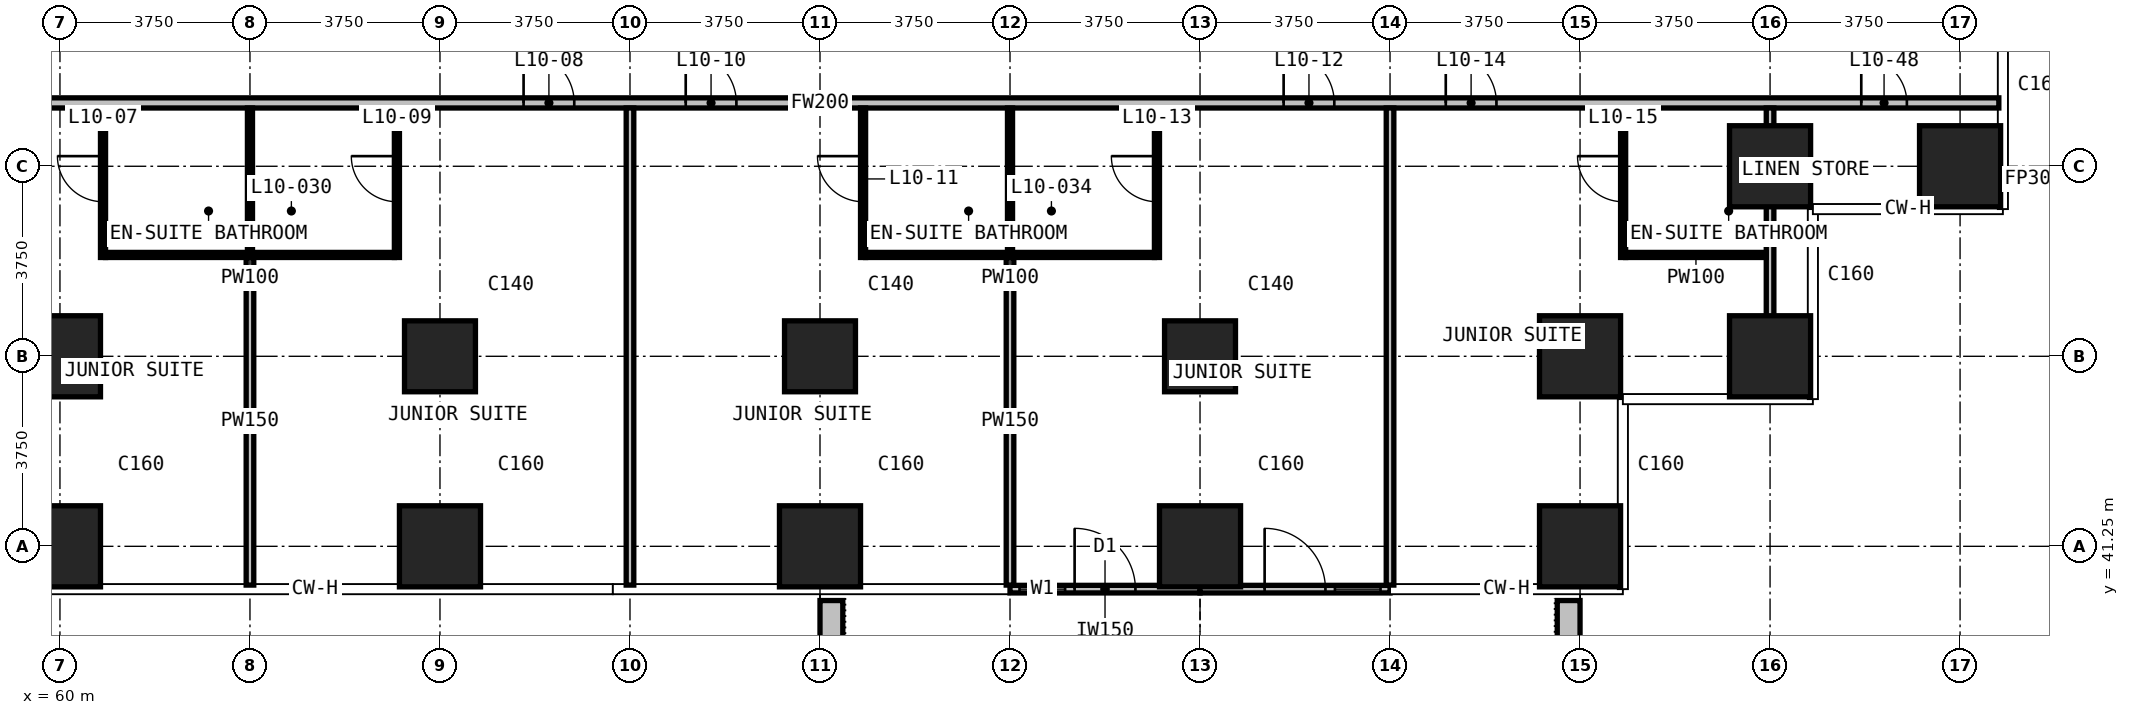
"""IFC4 building model, lengths in metres.
Left out: names, types, materials, properties, quantities, classifications, styles, units other than length and angle.
Written with IfcOpenShell. Run it as: python <this file> out.ifc"""

import sys

from ifc_helpers import new_model, si_unit, direction, frame, frame_2d, origin, origin_2d, place, context, subcontext, project, spatial, rectangle, extrude, element, fill, save


model = new_model("IFC4")
c1 = context("Model", 3, precision=1e-05, world=origin(), true_north=direction((0.0, 1.0)))
c2 = subcontext(c1, "Body", "Model", "MODEL_VIEW")
j1 = project(units=[si_unit("LENGTHUNIT", "METRE"), si_unit("PLANEANGLEUNIT", "RADIAN")], contexts=[c1])
p1 = place(None, origin())
s1 = spatial("IfcSite", under=j1, at=p1, CompositionType="ELEMENT")
p2 = place(p1, origin())
s2 = spatial("IfcBuilding", under=s1, at=p2, CompositionType="ELEMENT")
p3 = place(p2, frame((0.0, 0.0, 52.7)))
s3 = spatial("IfcBuildingStorey", under=s2, at=p3, CompositionType="ELEMENT", Elevation=52.7)
for number, where, z_axis, x_axis in (
    (1, (60.0, 41.25, 0.0), (0.0, 0.0, 1.0), (1.0, 0.0, 0.0)),
    (2, (60.0, 45.0, 0.0), (0.0, 0.0, 1.0), (1.0, 0.0, 0.0)),
    (3, (67.5, 41.25, 0.0), (0.0, 0.0, 1.0), (1.0, 0.0, 0.0)),
):
    element("IfcColumn", number, at=place(p3, frame(where, z_axis=z_axis, x_axis=x_axis)), inside=s3, PredefinedType="COLUMN", context=c2, shape_type="SweptSolid", body=[
        extrude(rectangle(XDim=1.6, YDim=1.6, at=origin_2d()), origin(), (0.0, 0.0, 1.0), 3.3),
    ])
p4 = place(p3, frame((67.5, 45.0, 0.0), z_axis=(0.0, 0.0, 1.0), x_axis=(1.0, 0.0, 0.0)))
e4 = element("IfcColumn", 4, at=p4, inside=s3, PredefinedType="COLUMN", context=c2, shape_type="SweptSolid", body=[
    extrude(rectangle(XDim=1.4, YDim=1.4, at=origin_2d()), origin(), (0.0, 0.0, 1.0), 3.3),
])
p5 = place(p3, frame((75.0, 41.25, 0.0), z_axis=(0.0, 0.0, 1.0), x_axis=(1.0, 0.0, 0.0)))
e5 = element("IfcColumn", 5, at=p5, inside=s3, PredefinedType="COLUMN", context=c2, shape_type="SweptSolid", body=[
    extrude(rectangle(XDim=1.6, YDim=1.6, at=origin_2d()), origin(), (0.0, 0.0, 1.0), 3.3),
])
p6 = place(p3, frame((75.0, 45.0, 0.0), z_axis=(0.0, 0.0, 1.0), x_axis=(1.0, 0.0, 0.0)))
e6 = element("IfcColumn", 6, at=p6, inside=s3, PredefinedType="COLUMN", context=c2, shape_type="SweptSolid", body=[
    extrude(rectangle(XDim=1.4, YDim=1.4, at=origin_2d()), origin(), (0.0, 0.0, 1.0), 3.3),
])
p7 = place(p3, frame((82.5, 41.25, 0.0), z_axis=(0.0, 0.0, 1.0), x_axis=(1.0, 0.0, 0.0)))
e7 = element("IfcColumn", 7, at=p7, inside=s3, PredefinedType="COLUMN", context=c2, shape_type="SweptSolid", body=[
    extrude(rectangle(XDim=1.6, YDim=1.6, at=origin_2d()), origin(), (0.0, 0.0, 1.0), 3.3),
])
p8 = place(p3, frame((82.5, 45.0, 0.0), z_axis=(0.0, 0.0, 1.0), x_axis=(1.0, 0.0, 0.0)))
e8 = element("IfcColumn", 8, at=p8, inside=s3, PredefinedType="COLUMN", context=c2, shape_type="SweptSolid", body=[
    extrude(rectangle(XDim=1.4, YDim=1.4, at=origin_2d()), origin(), (0.0, 0.0, 1.0), 3.3),
])
for number, where, z_axis, x_axis in (
    (9, (90.0, 41.25, 0.0), (0.0, 0.0, 1.0), (1.0, 0.0, 0.0)),
    (10, (90.0, 45.0, 0.0), (0.0, 0.0, 1.0), (1.0, 0.0, 0.0)),
    (11, (93.75, 45.0, 0.0), (0.0, 0.0, 1.0), (1.0, 0.0, 0.0)),
    (12, (93.75, 48.75, 0.0), (0.0, 0.0, 1.0), (1.0, 0.0, 0.0)),
    (13, (97.5, 48.75, 0.0), (0.0, 0.0, 1.0), (1.0, 0.0, 0.0)),
):
    element("IfcColumn", number, at=place(p3, frame(where, z_axis=z_axis, x_axis=x_axis)), inside=s3, PredefinedType="COLUMN", context=c2, shape_type="SweptSolid", body=[
        extrude(rectangle(XDim=1.6, YDim=1.6, at=origin_2d()), origin(), (0.0, 0.0, 1.0), 3.3),
    ])
p9 = place(p3, frame((78.75, 40.405, 0.0), z_axis=(0.0, 0.0, 1.0), x_axis=(1.0, 0.0, 0.0)))
e14 = element("IfcWall", 14, at=p9, inside=s3, PredefinedType="SOLIDWALL", context=c2, shape_type="SweptSolid", body=[
    extrude(rectangle(XDim=3.75, YDim=0.15, at=frame_2d((1.875, 0.0))), origin(), (0.0, 0.0, 1.0), 3.0),
])
p10 = place(p9, frame((0.188, 0.0, 0.1)))
e15 = element("IfcOpeningElement", 15, at=p10, cuts=e14, PredefinedType="OPENING", context=c2, shape_type="SweptSolid", body=[
    extrude(rectangle(XDim=0.9, YDim=2.4, at=frame_2d((0.45, 1.2))), frame((0.0, 0.085, 0.0), z_axis=(0.0, -1.0, 0.0), x_axis=(1.0, 0.0, 0.0)), (0.0, 0.0, 1.0), 0.17),
])
p11 = place(p9, frame((1.275, 0.0, 0.0)))
e16 = element("IfcOpeningElement", 16, at=p11, cuts=e14, PredefinedType="OPENING", context=c2, shape_type="SweptSolid", body=[
    extrude(rectangle(XDim=1.2, YDim=2.4, at=frame_2d((0.6, 1.2))), frame((0.0, 0.085, 0.0), z_axis=(0.0, -1.0, 0.0), x_axis=(1.0, 0.0, 0.0)), (0.0, 0.0, 1.0), 0.17),
])
p12 = place(p3, frame((82.5, 40.405, 0.0), z_axis=(0.0, 0.0, 1.0), x_axis=(1.0, 0.0, 0.0)))
e17 = element("IfcWall", 17, at=p12, inside=s3, PredefinedType="SOLIDWALL", context=c2, shape_type="SweptSolid", body=[
    extrude(rectangle(XDim=3.75, YDim=0.15, at=frame_2d((1.875, 0.0))), origin(), (0.0, 0.0, 1.0), 3.0),
])
p13 = place(p12, frame((1.275, 0.0, 0.0)))
e18 = element("IfcOpeningElement", 18, at=p13, cuts=e17, PredefinedType="OPENING", context=c2, shape_type="SweptSolid", body=[
    extrude(rectangle(XDim=1.2, YDim=2.4, at=frame_2d((0.6, 1.2))), frame((0.0, 0.085, 0.0), z_axis=(0.0, -1.0, 0.0), x_axis=(1.0, 0.0, 0.0)), (0.0, 0.0, 1.0), 0.17),
])
p14 = place(p12, frame((2.663, 0.0, 0.1)))
e19 = element("IfcOpeningElement", 19, at=p14, cuts=e17, PredefinedType="OPENING", context=c2, shape_type="SweptSolid", body=[
    extrude(rectangle(XDim=0.9, YDim=2.4, at=frame_2d((0.45, 1.2))), frame((0.0, 0.085, 0.0), z_axis=(0.0, -1.0, 0.0), x_axis=(1.0, 0.0, 0.0)), (0.0, 0.0, 1.0), 0.17),
])
for number, where, z_axis, x_axis in (
    (20, (75.225, 40.18, 0.0), (0.0, 0.0, 1.0), (0.0, -1.0, 0.0)),
    (21, (89.775, 40.18, 0.0), (0.0, 0.0, 1.0), (0.0, -1.0, 0.0)),
):
    element("IfcWall", number, at=place(p3, frame(where, z_axis=z_axis, x_axis=x_axis)), inside=s3, PredefinedType="USERDEFINED", context=c2, shape_type="SweptSolid", body=[
        extrude(rectangle(XDim=2.33, YDim=0.45, at=frame_2d((1.165, 0.0))), origin(), (0.0, 0.0, 1.0), 1.1),
    ])
p15 = place(p3, frame((51.735, 50.0, 0.0), z_axis=(0.0, 0.0, 1.0), x_axis=(1.0, 0.0, 0.0)))
e22 = element("IfcWall", 22, at=p15, inside=s3, PredefinedType="PARTITIONING", context=c2, shape_type="SweptSolid", body=[
    extrude(rectangle(XDim=46.53, YDim=0.2, at=frame_2d((23.265, 0.0))), origin(), (0.0, 0.0, 1.0), 3.0),
])
p16 = place(p15, frame((5.615, 0.0, 0.0)))
e23 = element("IfcOpeningElement", 23, at=p16, cuts=e22, PredefinedType="OPENING", context=c2, shape_type="SweptSolid", body=[
    extrude(rectangle(XDim=1.0, YDim=2.2, at=frame_2d((0.5, 1.1))), frame((0.0, 0.11, 0.0), z_axis=(0.0, -1.0, 0.0), x_axis=(1.0, 0.0, 0.0)), (0.0, 0.0, 1.0), 0.22),
])
p17 = place(p15, frame((17.415, 0.0, 0.0)))
e24 = element("IfcOpeningElement", 24, at=p17, cuts=e22, PredefinedType="OPENING", context=c2, shape_type="SweptSolid", body=[
    extrude(rectangle(XDim=1.0, YDim=2.2, at=frame_2d((0.5, 1.1))), frame((0.0, 0.11, 0.0), z_axis=(0.0, -1.0, 0.0), x_axis=(1.0, 0.0, 0.0)), (0.0, 0.0, 1.0), 0.22),
])
p18 = place(p15, frame((20.615, 0.0, 0.0)))
e25 = element("IfcOpeningElement", 25, at=p18, cuts=e22, PredefinedType="OPENING", context=c2, shape_type="SweptSolid", body=[
    extrude(rectangle(XDim=1.0, YDim=2.2, at=frame_2d((0.5, 1.1))), frame((0.0, 0.11, 0.0), z_axis=(0.0, -1.0, 0.0), x_axis=(1.0, 0.0, 0.0)), (0.0, 0.0, 1.0), 0.22),
])
p19 = place(p15, frame((32.415, 0.0, 0.0)))
e26 = element("IfcOpeningElement", 26, at=p19, cuts=e22, PredefinedType="OPENING", context=c2, shape_type="SweptSolid", body=[
    extrude(rectangle(XDim=1.0, YDim=2.2, at=frame_2d((0.5, 1.1))), frame((0.0, 0.11, 0.0), z_axis=(0.0, -1.0, 0.0), x_axis=(1.0, 0.0, 0.0)), (0.0, 0.0, 1.0), 0.22),
])
p20 = place(p15, frame((35.615, 0.0, 0.0)))
e27 = element("IfcOpeningElement", 27, at=p20, cuts=e22, PredefinedType="OPENING", context=c2, shape_type="SweptSolid", body=[
    extrude(rectangle(XDim=1.0, YDim=2.2, at=frame_2d((0.5, 1.1))), frame((0.0, 0.11, 0.0), z_axis=(0.0, -1.0, 0.0), x_axis=(1.0, 0.0, 0.0)), (0.0, 0.0, 1.0), 0.22),
])
p21 = place(p15, frame((1.8, 0.0, 0.0)))
e28 = element("IfcOpeningElement", 28, at=p21, cuts=e22, PredefinedType="OPENING", context=c2, shape_type="SweptSolid", body=[
    extrude(rectangle(XDim=0.9, YDim=2.2, at=frame_2d((0.45, 1.1))), frame((0.0, 0.11, 0.0), z_axis=(0.0, -1.0, 0.0), x_axis=(1.0, 0.0, 0.0)), (0.0, 0.0, 1.0), 0.22),
])
p22 = place(p15, frame((43.815, 0.0, 0.0)))
e29 = element("IfcOpeningElement", 29, at=p22, cuts=e22, PredefinedType="OPENING", context=c2, shape_type="SweptSolid", body=[
    extrude(rectangle(XDim=0.9, YDim=2.2, at=frame_2d((0.45, 1.1))), frame((0.0, 0.11, 0.0), z_axis=(0.0, -1.0, 0.0), x_axis=(1.0, 0.0, 0.0)), (0.0, 0.0, 1.0), 0.22),
])
p23 = place(p3, frame((63.75, 40.485, 0.0), z_axis=(0.0, 0.0, 1.0), x_axis=(0.0, 1.0, 0.0)))
e30 = element("IfcWall", 30, at=p23, inside=s3, PredefinedType="PARTITIONING", context=c2, shape_type="SweptSolid", body=[
    extrude(rectangle(XDim=6.465, YDim=0.15, at=frame_2d((3.232, 0.0))), origin(), (0.0, 0.0, 1.0), 3.0),
])
p24 = place(p3, frame((71.25, 40.485, 0.0), z_axis=(0.0, 0.0, 1.0), x_axis=(0.0, 1.0, 0.0)))
e31 = element("IfcWall", 31, at=p24, inside=s3, PredefinedType="PARTITIONING", context=c2, shape_type="SweptSolid", body=[
    extrude(rectangle(XDim=9.415, YDim=0.15, at=frame_2d((4.708, 0.0))), origin(), (0.0, 0.0, 1.0), 3.0),
])
p25 = place(p3, frame((78.75, 40.485, 0.0), z_axis=(0.0, 0.0, 1.0), x_axis=(0.0, 1.0, 0.0)))
e32 = element("IfcWall", 32, at=p25, inside=s3, PredefinedType="PARTITIONING", context=c2, shape_type="SweptSolid", body=[
    extrude(rectangle(XDim=6.465, YDim=0.15, at=frame_2d((3.232, 0.0))), origin(), (0.0, 0.0, 1.0), 3.0),
])
p26 = place(p3, frame((86.25, 40.485, 0.0), z_axis=(0.0, 0.0, 1.0), x_axis=(0.0, 1.0, 0.0)))
e33 = element("IfcWall", 33, at=p26, inside=s3, PredefinedType="PARTITIONING", context=c2, shape_type="SweptSolid", body=[
    extrude(rectangle(XDim=9.415, YDim=0.15, at=frame_2d((4.708, 0.0))), origin(), (0.0, 0.0, 1.0), 3.0),
])
p27 = place(p3, frame((93.75, 44.235, 0.0), z_axis=(0.0, 0.0, 1.0), x_axis=(0.0, 1.0, 0.0)))
e34 = element("IfcWall", 34, at=p27, inside=s3, PredefinedType="PARTITIONING", context=c2, shape_type="SweptSolid", body=[
    extrude(rectangle(XDim=5.665, YDim=0.15, at=frame_2d((2.833, 0.0))), origin(), (0.0, 0.0, 1.0), 3.0),
])
for number, where, z_axis, x_axis in (
    (35, (60.9, 47.0, 0.0), (0.0, 0.0, 1.0), (1.0, 0.0, 0.0)),
    (36, (75.9, 47.0, 0.0), (0.0, 0.0, 1.0), (1.0, 0.0, 0.0)),
):
    element("IfcWall", number, at=place(p3, frame(where, z_axis=z_axis, x_axis=x_axis)), inside=s3, PredefinedType="PARTITIONING", context=c2, shape_type="SweptSolid", body=[
        extrude(rectangle(XDim=5.7, YDim=0.1, at=frame_2d((2.85, 0.0))), origin(), (0.0, 0.0, 1.0), 3.0),
    ])
p28 = place(p3, frame((90.9, 47.0, 0.0), z_axis=(0.0, 0.0, 1.0), x_axis=(1.0, 0.0, 0.0)))
e37 = element("IfcWall", 37, at=p28, inside=s3, PredefinedType="PARTITIONING", context=c2, shape_type="SweptSolid", body=[
    extrude(rectangle(XDim=2.775, YDim=0.1, at=frame_2d((1.388, 0.0))), origin(), (0.0, 0.0, 1.0), 3.0),
])
p29 = place(p3, frame((60.85, 46.95, 0.0), z_axis=(0.0, 0.0, 1.0), x_axis=(0.0, 1.0, 0.0)))
e38 = element("IfcWall", 38, at=p29, inside=s3, PredefinedType="PARTITIONING", context=c2, shape_type="SweptSolid", body=[
    extrude(rectangle(XDim=2.95, YDim=0.1, at=frame_2d((1.475, 0.0))), origin(), (0.0, 0.0, 1.0), 3.0),
])
p30 = place(p29, frame((1.1, 0.0, 0.0)))
e39 = element("IfcOpeningElement", 39, at=p30, cuts=e38, PredefinedType="OPENING", context=c2, shape_type="SweptSolid", body=[
    extrude(rectangle(XDim=0.9, YDim=2.2, at=frame_2d((0.45, 1.1))), frame((0.0, 0.06, 0.0), z_axis=(0.0, -1.0, 0.0), x_axis=(1.0, 0.0, 0.0)), (0.0, 0.0, 1.0), 0.12),
])
p31 = place(p3, frame((63.75, 47.05, 0.0), z_axis=(0.0, 0.0, 1.0), x_axis=(0.0, 1.0, 0.0)))
e40 = element("IfcWall", 40, at=p31, inside=s3, PredefinedType="PARTITIONING", context=c2, shape_type="SweptSolid", body=[
    extrude(rectangle(XDim=2.85, YDim=0.1, at=frame_2d((1.425, 0.0))), origin(), (0.0, 0.0, 1.0), 3.0),
])
p32 = place(p3, frame((66.65, 46.95, 0.0), z_axis=(0.0, 0.0, 1.0), x_axis=(0.0, 1.0, 0.0)))
e41 = element("IfcWall", 41, at=p32, inside=s3, PredefinedType="PARTITIONING", context=c2, shape_type="SweptSolid", body=[
    extrude(rectangle(XDim=2.95, YDim=0.1, at=frame_2d((1.475, 0.0))), origin(), (0.0, 0.0, 1.0), 3.0),
])
p33 = place(p32, frame((1.1, 0.0, 0.0)))
e42 = element("IfcOpeningElement", 42, at=p33, cuts=e41, PredefinedType="OPENING", context=c2, shape_type="SweptSolid", body=[
    extrude(rectangle(XDim=0.9, YDim=2.2, at=frame_2d((0.45, 1.1))), frame((0.0, 0.06, 0.0), z_axis=(0.0, -1.0, 0.0), x_axis=(1.0, 0.0, 0.0)), (0.0, 0.0, 1.0), 0.12),
])
p34 = place(p3, frame((75.85, 46.95, 0.0), z_axis=(0.0, 0.0, 1.0), x_axis=(0.0, 1.0, 0.0)))
e43 = element("IfcWall", 43, at=p34, inside=s3, PredefinedType="PARTITIONING", context=c2, shape_type="SweptSolid", body=[
    extrude(rectangle(XDim=2.95, YDim=0.1, at=frame_2d((1.475, 0.0))), origin(), (0.0, 0.0, 1.0), 3.0),
])
p35 = place(p34, frame((1.1, 0.0, 0.0)))
e44 = element("IfcOpeningElement", 44, at=p35, cuts=e43, PredefinedType="OPENING", context=c2, shape_type="SweptSolid", body=[
    extrude(rectangle(XDim=0.9, YDim=2.2, at=frame_2d((0.45, 1.1))), frame((0.0, 0.06, 0.0), z_axis=(0.0, -1.0, 0.0), x_axis=(1.0, 0.0, 0.0)), (0.0, 0.0, 1.0), 0.12),
])
p36 = place(p3, frame((78.75, 47.05, 0.0), z_axis=(0.0, 0.0, 1.0), x_axis=(0.0, 1.0, 0.0)))
e45 = element("IfcWall", 45, at=p36, inside=s3, PredefinedType="PARTITIONING", context=c2, shape_type="SweptSolid", body=[
    extrude(rectangle(XDim=2.85, YDim=0.1, at=frame_2d((1.425, 0.0))), origin(), (0.0, 0.0, 1.0), 3.0),
])
p37 = place(p3, frame((81.65, 46.95, 0.0), z_axis=(0.0, 0.0, 1.0), x_axis=(0.0, 1.0, 0.0)))
e46 = element("IfcWall", 46, at=p37, inside=s3, PredefinedType="PARTITIONING", context=c2, shape_type="SweptSolid", body=[
    extrude(rectangle(XDim=2.95, YDim=0.1, at=frame_2d((1.475, 0.0))), origin(), (0.0, 0.0, 1.0), 3.0),
])
p38 = place(p37, frame((1.1, 0.0, 0.0)))
e47 = element("IfcOpeningElement", 47, at=p38, cuts=e46, PredefinedType="OPENING", context=c2, shape_type="SweptSolid", body=[
    extrude(rectangle(XDim=0.9, YDim=2.2, at=frame_2d((0.45, 1.1))), frame((0.0, 0.06, 0.0), z_axis=(0.0, -1.0, 0.0), x_axis=(1.0, 0.0, 0.0)), (0.0, 0.0, 1.0), 0.12),
])
p39 = place(p3, frame((90.85, 46.95, 0.0), z_axis=(0.0, 0.0, 1.0), x_axis=(0.0, 1.0, 0.0)))
e48 = element("IfcWall", 48, at=p39, inside=s3, PredefinedType="PARTITIONING", context=c2, shape_type="SweptSolid", body=[
    extrude(rectangle(XDim=2.95, YDim=0.1, at=frame_2d((1.475, 0.0))), origin(), (0.0, 0.0, 1.0), 3.0),
])
p40 = place(p39, frame((1.1, 0.0, 0.0)))
e49 = element("IfcOpeningElement", 49, at=p40, cuts=e48, PredefinedType="OPENING", context=c2, shape_type="SweptSolid", body=[
    extrude(rectangle(XDim=0.9, YDim=2.2, at=frame_2d((0.45, 1.1))), frame((0.0, 0.06, 0.0), z_axis=(0.0, -1.0, 0.0), x_axis=(1.0, 0.0, 0.0)), (0.0, 0.0, 1.0), 0.12),
])
p41 = place(p10, origin())
e50 = element("IfcWindow", 50, at=p41, inside=s3, PartitioningType="SINGLE_PANEL", PredefinedType="WINDOW", context=c2, shape_type="SweptSolid", body=[
    extrude(rectangle(XDim=0.9, YDim=2.4, at=frame_2d((0.45, 1.2))), frame((0.0, 0.03, 0.0), z_axis=(0.0, -1.0, 0.0), x_axis=(1.0, 0.0, 0.0)), (0.0, 0.0, 1.0), 0.06),
])
fill(e15, e50)
p42 = place(p11, origin())
e51 = element("IfcDoor", 51, at=p42, inside=s3, OperationType="SINGLE_SWING_LEFT", PredefinedType="DOOR", context=c2, shape_type="SweptSolid", body=[
    extrude(rectangle(XDim=1.2, YDim=2.4, at=frame_2d((0.6, 1.2))), frame((0.0, 0.025, 0.0), z_axis=(0.0, -1.0, 0.0), x_axis=(1.0, 0.0, 0.0)), (0.0, 0.0, 1.0), 0.05),
])
fill(e16, e51)
p43 = place(p13, origin())
e52 = element("IfcDoor", 52, at=p43, inside=s3, OperationType="SINGLE_SWING_LEFT", PredefinedType="DOOR", context=c2, shape_type="SweptSolid", body=[
    extrude(rectangle(XDim=1.2, YDim=2.4, at=frame_2d((0.6, 1.2))), frame((0.0, 0.025, 0.0), z_axis=(0.0, -1.0, 0.0), x_axis=(1.0, 0.0, 0.0)), (0.0, 0.0, 1.0), 0.05),
])
fill(e18, e52)
p44 = place(p14, origin())
e53 = element("IfcWindow", 53, at=p44, inside=s3, PartitioningType="SINGLE_PANEL", PredefinedType="WINDOW", context=c2, shape_type="SweptSolid", body=[
    extrude(rectangle(XDim=0.9, YDim=2.4, at=frame_2d((0.45, 1.2))), frame((0.0, 0.03, 0.0), z_axis=(0.0, -1.0, 0.0), x_axis=(1.0, 0.0, 0.0)), (0.0, 0.0, 1.0), 0.06),
])
fill(e19, e53)
p45 = place(p30, origin())
e54 = element("IfcDoor", 54, at=p45, inside=s3, OperationType="SINGLE_SWING_RIGHT", PredefinedType="DOOR", context=c2, shape_type="SweptSolid", body=[
    extrude(rectangle(XDim=0.9, YDim=2.2, at=frame_2d((0.45, 1.1))), frame((0.0, 0.025, 0.0), z_axis=(0.0, -1.0, 0.0), x_axis=(1.0, 0.0, 0.0)), (0.0, 0.0, 1.0), 0.05),
])
fill(e39, e54)
p46 = place(p17, origin())
e55 = element("IfcDoor", 55, at=p46, inside=s3, OperationType="SINGLE_SWING_LEFT", PredefinedType="DOOR", context=c2, shape_type="SweptSolid", body=[
    extrude(rectangle(XDim=1.0, YDim=2.2, at=frame_2d((0.5, 1.1))), frame((0.0, 0.025, 0.0), z_axis=(0.0, -1.0, 0.0), x_axis=(1.0, 0.0, 0.0)), (0.0, 0.0, 1.0), 0.05),
])
fill(e24, e55)
p47 = place(p33, origin())
e56 = element("IfcDoor", 56, at=p47, inside=s3, OperationType="SINGLE_SWING_RIGHT", PredefinedType="DOOR", context=c2, shape_type="SweptSolid", body=[
    extrude(rectangle(XDim=0.9, YDim=2.2, at=frame_2d((0.45, 1.1))), frame((0.0, 0.025, 0.0), z_axis=(0.0, -1.0, 0.0), x_axis=(1.0, 0.0, 0.0)), (0.0, 0.0, 1.0), 0.05),
])
fill(e42, e56)
p48 = place(p18, origin())
e57 = element("IfcDoor", 57, at=p48, inside=s3, OperationType="SINGLE_SWING_LEFT", PredefinedType="DOOR", context=c2, shape_type="SweptSolid", body=[
    extrude(rectangle(XDim=1.0, YDim=2.2, at=frame_2d((0.5, 1.1))), frame((0.0, 0.025, 0.0), z_axis=(0.0, -1.0, 0.0), x_axis=(1.0, 0.0, 0.0)), (0.0, 0.0, 1.0), 0.05),
])
fill(e25, e57)
p49 = place(p35, origin())
e58 = element("IfcDoor", 58, at=p49, inside=s3, OperationType="SINGLE_SWING_RIGHT", PredefinedType="DOOR", context=c2, shape_type="SweptSolid", body=[
    extrude(rectangle(XDim=0.9, YDim=2.2, at=frame_2d((0.45, 1.1))), frame((0.0, 0.025, 0.0), z_axis=(0.0, -1.0, 0.0), x_axis=(1.0, 0.0, 0.0)), (0.0, 0.0, 1.0), 0.05),
])
fill(e44, e58)
p50 = place(p19, origin())
e59 = element("IfcDoor", 59, at=p50, inside=s3, OperationType="SINGLE_SWING_RIGHT", PredefinedType="DOOR", context=c2, shape_type="SweptSolid", body=[
    extrude(rectangle(XDim=1.0, YDim=2.2, at=frame_2d((0.5, 1.1))), frame((0.0, 0.025, 0.0), z_axis=(0.0, -1.0, 0.0), x_axis=(1.0, 0.0, 0.0)), (0.0, 0.0, 1.0), 0.05),
])
fill(e26, e59)
p51 = place(p38, origin())
e60 = element("IfcDoor", 60, at=p51, inside=s3, OperationType="SINGLE_SWING_RIGHT", PredefinedType="DOOR", context=c2, shape_type="SweptSolid", body=[
    extrude(rectangle(XDim=0.9, YDim=2.2, at=frame_2d((0.45, 1.1))), frame((0.0, 0.025, 0.0), z_axis=(0.0, -1.0, 0.0), x_axis=(1.0, 0.0, 0.0)), (0.0, 0.0, 1.0), 0.05),
])
fill(e47, e60)
p52 = place(p20, origin())
e61 = element("IfcDoor", 61, at=p52, inside=s3, OperationType="SINGLE_SWING_LEFT", PredefinedType="DOOR", context=c2, shape_type="SweptSolid", body=[
    extrude(rectangle(XDim=1.0, YDim=2.2, at=frame_2d((0.5, 1.1))), frame((0.0, 0.025, 0.0), z_axis=(0.0, -1.0, 0.0), x_axis=(1.0, 0.0, 0.0)), (0.0, 0.0, 1.0), 0.05),
])
fill(e27, e61)
p53 = place(p40, origin())
e62 = element("IfcDoor", 62, at=p53, inside=s3, OperationType="SINGLE_SWING_RIGHT", PredefinedType="DOOR", context=c2, shape_type="SweptSolid", body=[
    extrude(rectangle(XDim=0.9, YDim=2.2, at=frame_2d((0.45, 1.1))), frame((0.0, 0.025, 0.0), z_axis=(0.0, -1.0, 0.0), x_axis=(1.0, 0.0, 0.0)), (0.0, 0.0, 1.0), 0.05),
])
fill(e49, e62)
p54 = place(p22, origin())
e63 = element("IfcDoor", 63, at=p54, inside=s3, OperationType="SINGLE_SWING_LEFT", PredefinedType="DOOR", context=c2, shape_type="SweptSolid", body=[
    extrude(rectangle(XDim=0.9, YDim=2.2, at=frame_2d((0.45, 1.1))), frame((0.0, 0.025, 0.0), z_axis=(0.0, -1.0, 0.0), x_axis=(1.0, 0.0, 0.0)), (0.0, 0.0, 1.0), 0.05),
])
fill(e29, e63)
save(model, sys.argv[1])
